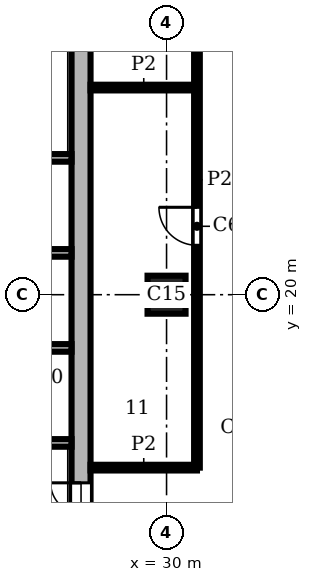
"""IFC4 building model, lengths in metres.
Left out: names, types, materials, properties, quantities, classifications, styles, units other than length and angle.
Written with IfcOpenShell. Run it as: python <this file> out.ifc"""

import sys

from ifc_helpers import new_model, si_unit, direction, frame, frame_2d, origin, origin_2d, place, context, subcontext, project, spatial, rectangle, extrude, element, fill, save


model = new_model("IFC4")
c1 = context("Model", 3, precision=1e-05, world=origin(), true_north=direction((0.0, 1.0)))
c2 = subcontext(c1, "Body", "Model", "MODEL_VIEW")
j1 = project(units=[si_unit("LENGTHUNIT", "METRE"), si_unit("PLANEANGLEUNIT", "RADIAN")], contexts=[c1])
p1 = place(None, origin())
s1 = spatial("IfcSite", under=j1, at=p1, CompositionType="ELEMENT")
p2 = place(p1, origin())
s2 = spatial("IfcBuilding", under=s1, at=p2, CompositionType="ELEMENT")
p3 = place(p2, frame((0.0, 0.0, 294.3)))
s3 = spatial("IfcBuildingStorey", under=s2, at=p3, CompositionType="ELEMENT", Elevation=294.3)
p4 = place(p3, frame((30.0, 20.0, 0.0), z_axis=(0.0, 0.0, 1.0), x_axis=(1.0, 0.0, 0.0)))
e1 = element("IfcColumn", 1, at=p4, inside=s3, PredefinedType="COLUMN", context=c2, shape_type="SweptSolid", body=[
    extrude(rectangle(XDim=1.0, YDim=1.0, at=origin_2d()), origin(), (0.0, 0.0, 1.0), 3.9),
])
p5 = place(p3, frame((27.75, 8.5, 0.0), z_axis=(0.0, 0.0, 1.0), x_axis=(0.0, 1.0, 0.0)))
e2 = element("IfcWall", 2, at=p5, inside=s3, PredefinedType="SHEAR", context=c2, shape_type="SweptSolid", body=[
    extrude(rectangle(XDim=19.0, YDim=0.5, at=frame_2d((9.5, 0.0))), origin(), (0.0, 0.0, 1.0), 3.9),
])
p6 = place(p5, frame((4.95, 0.0, 0.0)))
e3 = element("IfcOpeningElement", 3, at=p6, cuts=e2, PredefinedType="OPENING", context=c2, shape_type="SweptSolid", body=[
    extrude(rectangle(XDim=1.6, YDim=2.1, at=frame_2d((0.8, 1.05))), frame((0.0, 0.26, 0.0), z_axis=(0.0, -1.0, 0.0), x_axis=(1.0, 0.0, 0.0)), (0.0, 0.0, 1.0), 0.52),
])
for number, where, z_axis, x_axis in (
    (4, (24.3, 16.1, 0.0), (0.0, 0.0, 1.0), (1.0, 0.0, 0.0)),
    (5, (24.3, 18.6, 0.0), (0.0, 0.0, 1.0), (1.0, 0.0, 0.0)),
    (6, (24.3, 21.1, 0.0), (0.0, 0.0, 1.0), (1.0, 0.0, 0.0)),
):
    element("IfcWall", number, at=place(p3, frame(where, z_axis=z_axis, x_axis=x_axis)), inside=s3, PredefinedType="SHEAR", context=c2, shape_type="SweptSolid", body=[
        extrude(rectangle(XDim=3.2, YDim=0.2, at=frame_2d((1.6, 0.0))), origin(), (0.0, 0.0, 1.0), 3.58),
    ])
p7 = place(p3, frame((13.8, 23.6, 0.0), z_axis=(0.0, 0.0, 1.0), x_axis=(1.0, 0.0, 0.0)))
e7 = element("IfcWall", 7, at=p7, inside=s3, PredefinedType="SHEAR", context=c2, shape_type="SweptSolid", body=[
    extrude(rectangle(XDim=13.7, YDim=0.2, at=frame_2d((6.85, 0.0))), origin(), (0.0, 0.0, 1.0), 3.58),
])
p8 = place(p7, frame((2.4, 0.0, 0.0)))
e8 = element("IfcOpeningElement", 8, at=p8, cuts=e7, PredefinedType="OPENING", context=c2, shape_type="SweptSolid", body=[
    extrude(rectangle(XDim=1.1, YDim=2.1, at=frame_2d((0.55, 1.05))), frame((0.0, 0.11, 0.0), z_axis=(0.0, -1.0, 0.0), x_axis=(1.0, 0.0, 0.0)), (0.0, 0.0, 1.0), 0.22),
])
p9 = place(p7, frame((4.9, 0.0, 0.0)))
e9 = element("IfcOpeningElement", 9, at=p9, cuts=e7, PredefinedType="OPENING", context=c2, shape_type="SweptSolid", body=[
    extrude(rectangle(XDim=1.1, YDim=2.1, at=frame_2d((0.55, 1.05))), frame((0.0, 0.11, 0.0), z_axis=(0.0, -1.0, 0.0), x_axis=(1.0, 0.0, 0.0)), (0.0, 0.0, 1.0), 0.22),
])
p10 = place(p7, frame((0.15, 0.0, 0.0)))
e10 = element("IfcOpeningElement", 10, at=p10, cuts=e7, PredefinedType="OPENING", context=c2, shape_type="SweptSolid", body=[
    extrude(rectangle(XDim=1.0, YDim=2.1, at=frame_2d((0.5, 1.05))), frame((0.0, 0.11, 0.0), z_axis=(0.0, -1.0, 0.0), x_axis=(1.0, 0.0, 0.0)), (0.0, 0.0, 1.0), 0.22),
])
p11 = place(p3, frame((30.8, 15.45, 0.0), z_axis=(0.0, 0.0, 1.0), x_axis=(0.0, 1.0, 0.0)))
e11 = element("IfcWall", 11, at=p11, inside=s3, PredefinedType="PARTITIONING", context=c2, shape_type="SweptSolid", body=[
    extrude(rectangle(XDim=15.15, YDim=0.15, at=frame_2d((7.575, 0.0))), origin(), (0.0, 0.0, 1.0), 3.58),
])
p12 = place(p11, frame((5.85, 0.0, 0.0)))
e12 = element("IfcOpeningElement", 12, at=p12, cuts=e11, PredefinedType="OPENING", context=c2, shape_type="SweptSolid", body=[
    extrude(rectangle(XDim=1.0, YDim=2.1, at=frame_2d((0.5, 1.05))), frame((0.0, 0.085, 0.0), z_axis=(0.0, -1.0, 0.0), x_axis=(1.0, 0.0, 0.0)), (0.0, 0.0, 1.0), 0.17),
])
p13 = place(p11, frame((11.35, 0.0, 0.0)))
e13 = element("IfcOpeningElement", 13, at=p13, cuts=e11, PredefinedType="OPENING", context=c2, shape_type="SweptSolid", body=[
    extrude(rectangle(XDim=1.0, YDim=2.1, at=frame_2d((0.5, 1.05))), frame((0.0, 0.085, 0.0), z_axis=(0.0, -1.0, 0.0), x_axis=(1.0, 0.0, 0.0)), (0.0, 0.0, 1.0), 0.17),
])
for number, where, z_axis, x_axis in (
    (14, (28.0, 15.45, 0.0), (0.0, 0.0, 1.0), (1.0, 0.0, 0.0)),
    (15, (28.0, 25.45, 0.0), (0.0, 0.0, 1.0), (1.0, 0.0, 0.0)),
):
    element("IfcWall", number, at=place(p3, frame(where, z_axis=z_axis, x_axis=x_axis)), inside=s3, PredefinedType="PARTITIONING", context=c2, shape_type="SweptSolid", body=[
        extrude(rectangle(XDim=2.8, YDim=0.15, at=frame_2d((1.4, 0.0))), origin(), (0.0, 0.0, 1.0), 3.58),
    ])
p14 = place(p6, origin())
e16 = element("IfcDoor", 16, at=p14, inside=s3, OperationType="DOUBLE_DOOR_SINGLE_SWING", PredefinedType="DOOR", context=c2, shape_type="SweptSolid", body=[
    extrude(rectangle(XDim=1.6, YDim=2.1, at=frame_2d((0.8, 1.05))), frame((0.0, 0.025, 0.0), z_axis=(0.0, -1.0, 0.0), x_axis=(1.0, 0.0, 0.0)), (0.0, 0.0, 1.0), 0.05),
])
fill(e3, e16)
p15 = place(p12, origin())
e17 = element("IfcDoor", 17, at=p15, inside=s3, OperationType="SINGLE_SWING_RIGHT", PredefinedType="DOOR", context=c2, shape_type="SweptSolid", body=[
    extrude(rectangle(XDim=1.0, YDim=2.1, at=frame_2d((0.5, 1.05))), frame((0.0, 0.025, 0.0), z_axis=(0.0, -1.0, 0.0), x_axis=(1.0, 0.0, 0.0)), (0.0, 0.0, 1.0), 0.05),
])
fill(e12, e17)
save(model, sys.argv[1])
